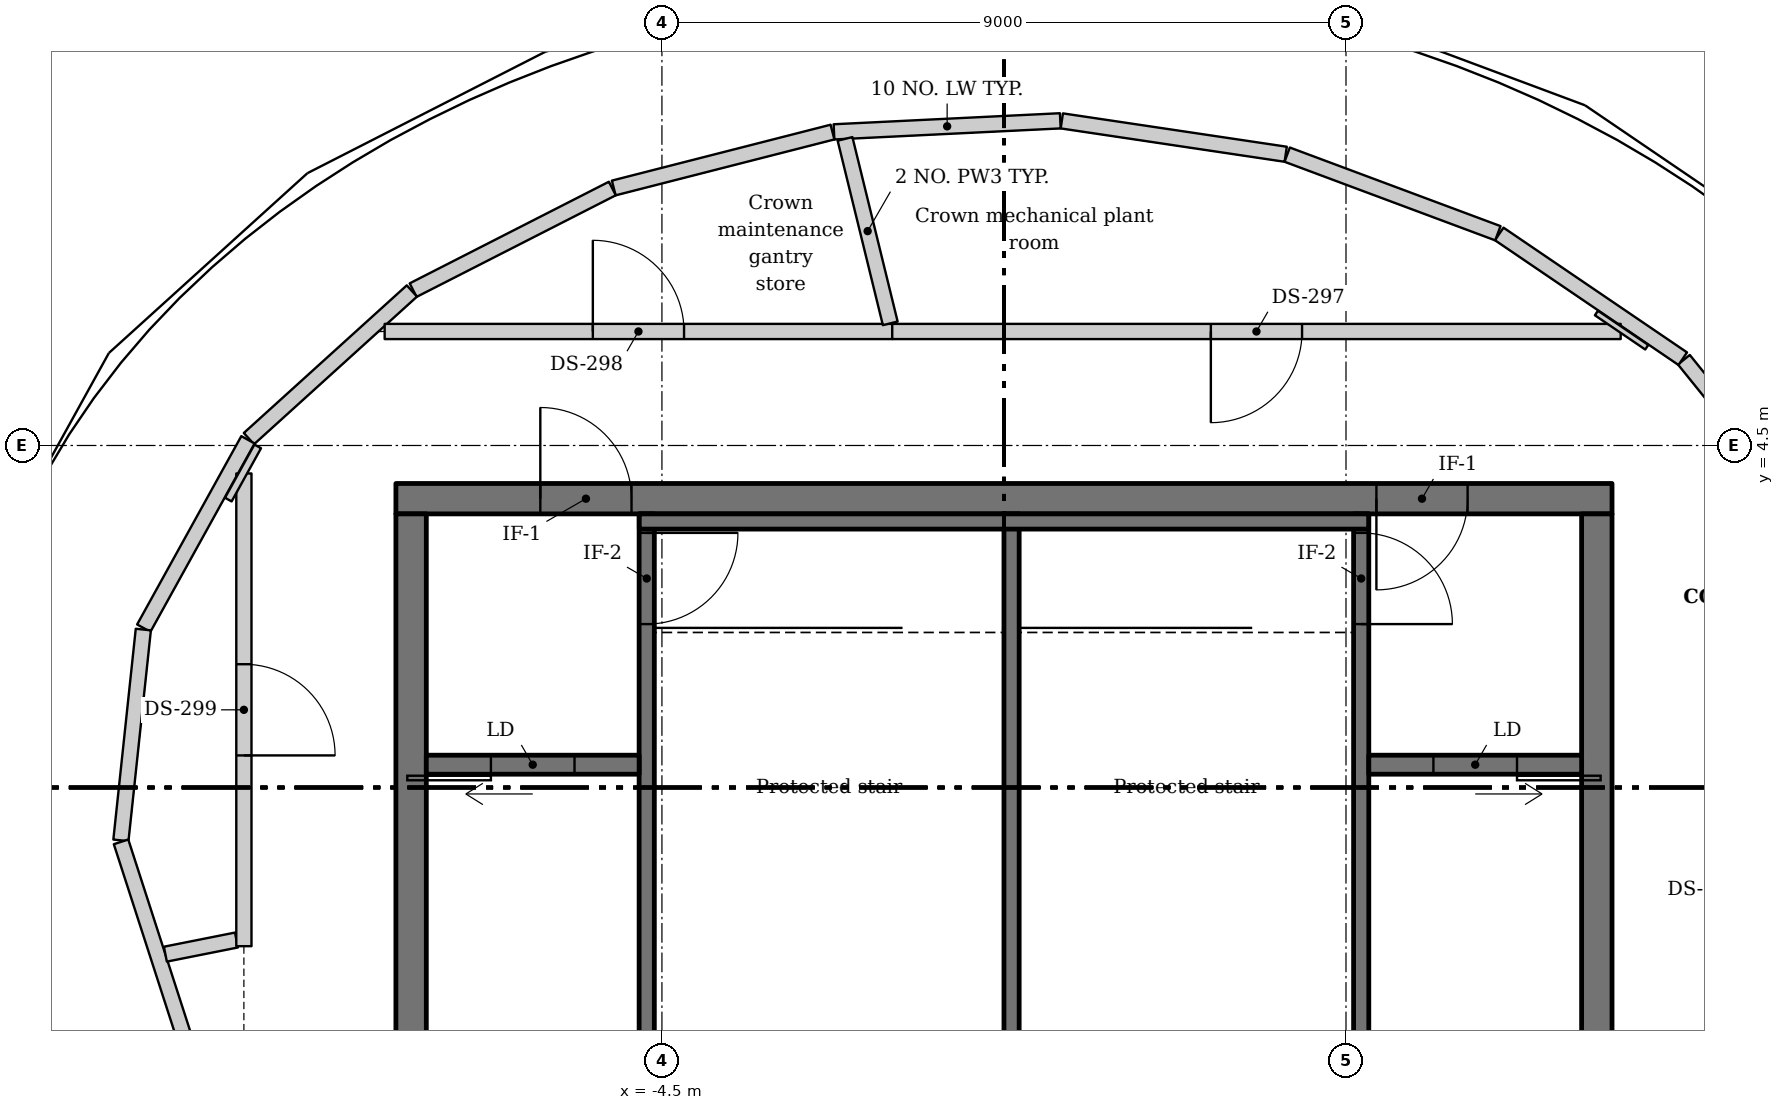
"""IFC4 building model, lengths in metres.
Left out: names, types, materials, properties, quantities, classifications, styles, units other than length and angle.
Written with IfcOpenShell. Run it as: python <this file> out.ifc"""

import sys

from ifc_helpers import new_model, si_unit, direction, frame, frame_2d, origin, place, context, subcontext, project, spatial, rectangle, extrude, source, transform, mapped, element, fill, save


model = new_model("IFC4")
c1 = context("Model", 3, precision=1e-05, world=origin(), true_north=direction((0.0, 1.0)))
c2 = subcontext(c1, "Body", "Model", "MODEL_VIEW")
j1 = project(units=[si_unit("LENGTHUNIT", "METRE"), si_unit("PLANEANGLEUNIT", "RADIAN")], contexts=[c1])
p1 = place(None, origin())
s1 = spatial("IfcSite", under=j1, at=p1, CompositionType="ELEMENT")
p2 = place(p1, origin())
s2 = spatial("IfcBuilding", under=s1, at=p2, CompositionType="ELEMENT")
p3 = place(p2, frame((0.0, 0.0, 370.0)))
s3 = spatial("IfcBuildingStorey", under=s2, at=p3, CompositionType="ELEMENT", Elevation=370.0)
m1 = source(origin(), c2, "Body", "SweptSolid", [
    extrude(rectangle(XDim=16.0, YDim=0.4, at=frame_2d((8.0, 0.0))), origin(), (0.0, 0.0, 1.0), 4.45),
])
p4 = place(p3, frame((-8.0, 3.8, -0.25), z_axis=(0.0, 0.0, 1.0), x_axis=(1.0, 0.0, 0.0)))
e1 = element("IfcWall", 1, at=p4, inside=s3, PredefinedType="SHEAR", context=c2, shape_type="MappedRepresentation", body=[
    mapped(m1, transform((0.0, 0.0, 0.0))),
])
m2 = source(origin(), c2, "Body", "SweptSolid", [
    extrude(rectangle(XDim=1.2, YDim=2.1, at=frame_2d((0.6, 1.05))), frame((0.0, 0.21, 0.0), z_axis=(0.0, -1.0, 0.0), x_axis=(1.0, 0.0, 0.0)), (0.0, 0.0, 1.0), 0.42),
])
p5 = place(p4, frame((12.9, 0.0, 0.25)))
e2 = element("IfcOpeningElement", 2, at=p5, cuts=e1, PredefinedType="OPENING", context=c2, shape_type="MappedRepresentation", body=[
    mapped(m2, transform((0.0, 0.0, 0.0))),
])
p6 = place(p4, frame((1.9, 0.0, 0.25)))
e3 = element("IfcOpeningElement", 3, at=p6, cuts=e1, PredefinedType="OPENING", context=c2, shape_type="MappedRepresentation", body=[
    mapped(m2, transform((0.0, 0.0, 0.0))),
])
m3 = source(origin(), c2, "Body", "SweptSolid", [
    extrude(rectangle(XDim=7.2, YDim=0.4, at=frame_2d((3.6, 0.0))), origin(), (0.0, 0.0, 1.0), 4.45),
])
for number, where, z_axis, x_axis in (
    (4, (7.8, -3.6, -0.25), (0.0, 0.0, 1.0), (0.0, 1.0, 0.0)),
    (5, (-7.8, -3.6, -0.25), (0.0, 0.0, 1.0), (0.0, 1.0, 0.0)),
):
    element("IfcWall", number, at=place(p3, frame(where, z_axis=z_axis, x_axis=x_axis)), inside=s3, PredefinedType="SHEAR", context=c2, shape_type="MappedRepresentation", body=[
        mapped(m3, transform((0.0, 0.0, 0.0))),
    ])
m4 = source(origin(), c2, "Body", "SweptSolid", [
    extrude(rectangle(XDim=2.863, YDim=0.2, at=frame_2d((1.432, 0.0))), origin(), (0.0, 0.0, 1.0), 4.2),
])
p7 = place(p3, frame((8.945, 5.629, 0.0), z_axis=(0.0, 0.0, 1.0), x_axis=(0.628223975098, -0.77803254245, 0.0)))
e6 = element("IfcWall", 6, at=p7, inside=s3, PredefinedType="SOLIDWALL", context=c2, shape_type="MappedRepresentation", body=[
    mapped(m4, transform((0.0, 0.0, 0.0))),
])
m5 = source(origin(), c2, "Body", "SweptSolid", [
    extrude(rectangle(XDim=2.92, YDim=0.2, at=frame_2d((1.46, 0.0))), origin(), (0.0, 0.0, 1.0), 4.2),
])
p8 = place(p3, frame((6.516, 7.284, 0.0), z_axis=(0.0, 0.0, 1.0), x_axis=(0.827026010812, -0.562163657168, 0.0)))
e7 = element("IfcWall", 7, at=p8, inside=s3, PredefinedType="SOLIDWALL", context=c2, shape_type="MappedRepresentation", body=[
    mapped(m5, transform((0.0, 0.0, 0.0))),
])
m6 = source(origin(), c2, "Body", "SweptSolid", [
    extrude(rectangle(XDim=2.958, YDim=0.2, at=frame_2d((1.479, 0.0))), origin(), (0.0, 0.0, 1.0), 4.2),
])
p9 = place(p3, frame((3.726, 8.327, 0.0), z_axis=(0.0, 0.0, 1.0), x_axis=(0.936917921025, -0.349549437508, 0.0)))
e8 = element("IfcWall", 8, at=p9, inside=s3, PredefinedType="SOLIDWALL", context=c2, shape_type="MappedRepresentation", body=[
    mapped(m6, transform((0.0, 0.0, 0.0))),
])
m7 = source(origin(), c2, "Body", "SweptSolid", [
    extrude(rectangle(XDim=2.978, YDim=0.2, at=frame_2d((1.489, 0.0))), origin(), (0.0, 0.0, 1.0), 4.2),
])
p10 = place(p3, frame((0.761, 8.771, 0.0), z_axis=(0.0, 0.0, 1.0), x_axis=(0.989067040899, -0.147466567759, 0.0)))
e9 = element("IfcWall", 9, at=p10, inside=s3, PredefinedType="SOLIDWALL", context=c2, shape_type="MappedRepresentation", body=[
    mapped(m7, transform((0.0, 0.0, 0.0))),
])
m8 = source(origin(), c2, "Body", "SweptSolid", [
    extrude(rectangle(XDim=2.981, YDim=0.2, at=frame_2d((1.491, 0.0))), origin(), (0.0, 0.0, 1.0), 4.2),
])
p11 = place(p3, frame((-2.236, 8.627, 0.0), z_axis=(0.0, 0.0, 1.0), x_axis=(0.998812059487, 0.048728531928, 0.0)))
e10 = element("IfcWall", 10, at=p11, inside=s3, PredefinedType="SOLIDWALL", context=c2, shape_type="MappedRepresentation", body=[
    mapped(m8, transform((0.0, 0.0, 0.0))),
])
m9 = source(origin(), c2, "Body", "SweptSolid", [
    extrude(rectangle(XDim=2.97, YDim=0.2, at=frame_2d((1.485, 0.0))), origin(), (0.0, 0.0, 1.0), 4.2),
])
p12 = place(p3, frame((-5.134, 7.888, 0.0), z_axis=(0.0, 0.0, 1.0), x_axis=(0.968872424501, 0.247560548235, 0.0)))
e11 = element("IfcWall", 11, at=p12, inside=s3, PredefinedType="SOLIDWALL", context=c2, shape_type="MappedRepresentation", body=[
    mapped(m9, transform((0.0, 0.0, 0.0))),
])
m10 = source(origin(), c2, "Body", "SweptSolid", [
    extrude(rectangle(XDim=2.942, YDim=0.2, at=frame_2d((1.471, 0.0))), origin(), (0.0, 0.0, 1.0), 4.2),
])
p13 = place(p3, frame((-7.773, 6.544, 0.0), z_axis=(0.0, 0.0, 1.0), x_axis=(0.890779694992, 0.454435402439, 0.0)))
e12 = element("IfcWall", 12, at=p13, inside=s3, PredefinedType="SOLIDWALL", context=c2, shape_type="MappedRepresentation", body=[
    mapped(m10, transform((0.0, 0.0, 0.0))),
])
m11 = source(origin(), c2, "Body", "SweptSolid", [
    extrude(rectangle(XDim=2.894, YDim=0.2, at=frame_2d((1.447, 0.0))), origin(), (0.0, 0.0, 1.0), 4.2),
])
p14 = place(p3, frame((-9.934, 4.59, 0.0), z_axis=(0.0, 0.0, 1.0), x_axis=(0.741091893943, 0.671403607923, 0.0)))
e13 = element("IfcWall", 13, at=p14, inside=s3, PredefinedType="SOLIDWALL", context=c2, shape_type="MappedRepresentation", body=[
    mapped(m11, transform((0.0, 0.0, 0.0))),
])
m12 = source(origin(), c2, "Body", "SweptSolid", [
    extrude(rectangle(XDim=2.832, YDim=0.2, at=frame_2d((1.416, 0.0))), origin(), (0.0, 0.0, 1.0), 4.2),
])
p15 = place(p3, frame((-11.317, 2.097, 0.0), z_axis=(0.0, 0.0, 1.0), x_axis=(0.484068407446, 0.875030157716, 0.0)))
e14 = element("IfcWall", 14, at=p15, inside=s3, PredefinedType="SOLIDWALL", context=c2, shape_type="MappedRepresentation", body=[
    mapped(m12, transform((0.0, 0.0, 0.0))),
])
m13 = source(origin(), c2, "Body", "SweptSolid", [
    extrude(rectangle(XDim=2.789, YDim=0.2, at=frame_2d((1.395, 0.0))), origin(), (0.0, 0.0, 1.0), 4.2),
])
p16 = place(p3, frame((-11.618, -0.696, 0.0), z_axis=(0.0, 0.0, 1.0), x_axis=(0.105819200095, 0.994385386503, 0.0)))
e15 = element("IfcWall", 15, at=p16, inside=s3, PredefinedType="SOLIDWALL", context=c2, shape_type="MappedRepresentation", body=[
    mapped(m13, transform((0.0, 0.0, 0.0))),
])
m14 = source(origin(), c2, "Body", "SweptSolid", [
    extrude(rectangle(XDim=2.804, YDim=0.2, at=frame_2d((1.402, 0.0))), origin(), (0.0, 0.0, 1.0), 4.2),
])
p17 = place(p3, frame((-10.754, -3.384, 0.0), z_axis=(0.0, 0.0, 1.0), x_axis=(-0.30756994526, 0.951525474579, 0.0)))
e16 = element("IfcWall", 16, at=p17, inside=s3, PredefinedType="SOLIDWALL", context=c2, shape_type="MappedRepresentation", body=[
    mapped(m14, transform((0.0, 0.0, 0.0))),
])
m15 = source(origin(), c2, "Body", "SweptSolid", [
    extrude(rectangle(XDim=7.2, YDim=0.2, at=frame_2d((3.6, 0.0))), origin(), (0.0, 0.0, 1.0), 4.2),
])
p18 = place(p3, frame((0.1, 3.6, 0.0), z_axis=(0.0, 0.0, 1.0), x_axis=(0.0, -1.0, 0.0)))
e17 = element("IfcWall", 17, at=p18, inside=s3, PredefinedType="SHEAR", context=c2, shape_type="MappedRepresentation", body=[
    mapped(m15, transform((0.0, 0.0, 0.0))),
])
p19 = place(p3, frame((4.7, -3.6, 0.0), z_axis=(0.0, 0.0, 1.0), x_axis=(0.0, 1.0, 0.0)))
e18 = element("IfcWall", 18, at=p19, inside=s3, PredefinedType="SHEAR", context=c2, shape_type="MappedRepresentation", body=[
    mapped(m15, transform((0.0, 0.0, 0.0))),
])
m16 = source(origin(), c2, "Body", "SweptSolid", [
    extrude(rectangle(XDim=1.2, YDim=2.1, at=frame_2d((0.6, 1.05))), frame((0.0, 0.11, 0.0), z_axis=(0.0, -1.0, 0.0), x_axis=(1.0, 0.0, 0.0)), (0.0, 0.0, 1.0), 0.22),
])
p20 = place(p19, frame((5.75, 0.0, 0.0)))
e19 = element("IfcOpeningElement", 19, at=p20, cuts=e18, PredefinedType="OPENING", context=c2, shape_type="MappedRepresentation", body=[
    mapped(m16, transform((0.0, 0.0, 0.0))),
])
p21 = place(p3, frame((-4.7, 3.6, 0.0), z_axis=(0.0, 0.0, 1.0), x_axis=(0.0, -1.0, 0.0)))
e20 = element("IfcWall", 20, at=p21, inside=s3, PredefinedType="SHEAR", context=c2, shape_type="MappedRepresentation", body=[
    mapped(m15, transform((0.0, 0.0, 0.0))),
])
p22 = place(p21, frame((0.25, 0.0, 0.0)))
e21 = element("IfcOpeningElement", 21, at=p22, cuts=e20, PredefinedType="OPENING", context=c2, shape_type="MappedRepresentation", body=[
    mapped(m16, transform((0.0, 0.0, 0.0))),
])
m17 = source(origin(), c2, "Body", "SweptSolid", [
    extrude(rectangle(XDim=2.8, YDim=0.25, at=frame_2d((1.4, 0.0))), origin(), (0.0, 0.0, 1.0), 4.2),
])
p23 = place(p3, frame((7.6, 0.3, 0.0), z_axis=(0.0, 0.0, 1.0), x_axis=(-1.0, 0.0, 0.0)))
e22 = element("IfcWall", 22, at=p23, inside=s3, PredefinedType="SHEAR", context=c2, shape_type="MappedRepresentation", body=[
    mapped(m17, transform((0.0, 0.0, 0.0))),
])
m18 = source(origin(), c2, "Body", "SweptSolid", [
    extrude(rectangle(XDim=1.1, YDim=2.1, at=frame_2d((0.55, 1.05))), frame((0.0, 0.135, 0.0), z_axis=(0.0, -1.0, 0.0), x_axis=(1.0, 0.0, 0.0)), (0.0, 0.0, 1.0), 0.27),
])
p24 = place(p23, frame((0.85, 0.0, 0.0)))
e23 = element("IfcOpeningElement", 23, at=p24, cuts=e22, PredefinedType="OPENING", context=c2, shape_type="MappedRepresentation", body=[
    mapped(m18, transform((0.0, 0.0, 0.0))),
])
p25 = place(p3, frame((-4.8, 0.3, 0.0), z_axis=(0.0, 0.0, 1.0), x_axis=(-1.0, 0.0, 0.0)))
e24 = element("IfcWall", 24, at=p25, inside=s3, PredefinedType="SHEAR", context=c2, shape_type="MappedRepresentation", body=[
    mapped(m17, transform((0.0, 0.0, 0.0))),
])
p26 = place(p25, frame((0.85, 0.0, 0.0)))
e25 = element("IfcOpeningElement", 25, at=p26, cuts=e24, PredefinedType="OPENING", context=c2, shape_type="MappedRepresentation", body=[
    mapped(m18, transform((0.0, 0.0, 0.0))),
])
m19 = source(origin(), c2, "Body", "SweptSolid", [
    extrude(rectangle(XDim=9.596, YDim=0.2, at=frame_2d((4.798, 0.0))), origin(), (0.0, 0.0, 1.0), 4.2),
])
p27 = place(p3, frame((4.798, 3.5, 0.0), z_axis=(0.0, 0.0, 1.0), x_axis=(-1.0, 0.0, 0.0)))
e26 = element("IfcWall", 26, at=p27, inside=s3, PredefinedType="SHEAR", context=c2, shape_type="MappedRepresentation", body=[
    mapped(m19, transform((0.0, 0.0, 0.0))),
])
m20 = source(origin(), c2, "Body", "SweptSolid", [
    extrude(rectangle(XDim=0.953, YDim=0.2, at=frame_2d((0.477, 0.0))), origin(), (0.0, 0.0, 1.0), 4.2),
])
p28 = place(p3, frame((-10.098, -2.007, 0.0), z_axis=(0.0, 0.0, 1.0), x_axis=(-0.980777163818, -0.19513112241, 0.0)))
e27 = element("IfcWall", 27, at=p28, inside=s3, PredefinedType="PARTITIONING", context=c2, shape_type="MappedRepresentation", body=[
    mapped(m20, transform((0.0, 0.0, 0.0))),
])
m21 = source(origin(), c2, "Body", "SweptSolid", [
    extrude(rectangle(XDim=6.22, YDim=0.2, at=frame_2d((3.11, 0.0))), origin(), (0.0, 0.0, 1.0), 4.2),
])
p29 = place(p3, frame((-10.0, -2.088, 0.0), z_axis=(0.0, 0.0, 1.0), x_axis=(0.0, 1.0, 0.0)))
e28 = element("IfcWall", 28, at=p29, inside=s3, PredefinedType="PARTITIONING", context=c2, shape_type="MappedRepresentation", body=[
    mapped(m21, transform((0.0, 0.0, 0.0))),
])
p30 = place(p29, frame((2.51, 0.0, 0.0)))
e29 = element("IfcOpeningElement", 29, at=p30, cuts=e28, PredefinedType="OPENING", context=c2, shape_type="MappedRepresentation", body=[
    mapped(m16, transform((0.0, 0.0, 0.0))),
])
m22 = source(origin(), c2, "Body", "SweptSolid", [
    extrude(rectangle(XDim=6.678, YDim=0.2, at=frame_2d((3.339, 0.0))), origin(), (0.0, 0.0, 1.0), 4.2),
])
p31 = place(p3, frame((-8.148, 6.0, 0.0), z_axis=(0.0, 0.0, 1.0), x_axis=(1.0, 0.0, 0.0)))
e30 = element("IfcWall", 30, at=p31, inside=s3, PredefinedType="PARTITIONING", context=c2, shape_type="MappedRepresentation", body=[
    mapped(m22, transform((0.0, 0.0, 0.0))),
])
p32 = place(p31, frame((2.739, 0.0, 0.0)))
e31 = element("IfcOpeningElement", 31, at=p32, cuts=e30, PredefinedType="OPENING", context=c2, shape_type="MappedRepresentation", body=[
    mapped(m16, transform((0.0, 0.0, 0.0))),
])
m23 = source(origin(), c2, "Body", "SweptSolid", [
    extrude(rectangle(XDim=2.499, YDim=0.2, at=frame_2d((1.25, 0.0))), origin(), (0.0, 0.0, 1.0), 4.2),
])
p33 = place(p3, frame((-1.496, 6.107, 0.0), z_axis=(0.0, 0.0, 1.0), x_axis=(-0.238096332587, 0.971241543803, 0.0)))
e32 = element("IfcWall", 32, at=p33, inside=s3, PredefinedType="PARTITIONING", context=c2, shape_type="MappedRepresentation", body=[
    mapped(m23, transform((0.0, 0.0, 0.0))),
])
m24 = source(origin(), c2, "Body", "SweptSolid", [
    extrude(rectangle(XDim=9.584, YDim=0.2, at=frame_2d((4.792, 0.0))), origin(), (0.0, 0.0, 1.0), 4.2),
])
p34 = place(p3, frame((-1.47, 6.0, 0.0), z_axis=(0.0, 0.0, 1.0), x_axis=(1.0, 0.0, 0.0)))
e33 = element("IfcWall", 33, at=p34, inside=s3, PredefinedType="PARTITIONING", context=c2, shape_type="MappedRepresentation", body=[
    mapped(m24, transform((0.0, 0.0, 0.0))),
])
p35 = place(p34, frame((4.192, 0.0, 0.0)))
e34 = element("IfcOpeningElement", 34, at=p35, cuts=e33, PredefinedType="OPENING", context=c2, shape_type="MappedRepresentation", body=[
    mapped(m16, transform((0.0, 0.0, 0.0))),
])
m25 = source(origin(), c2, "Body", "SweptSolid", [
    extrude(rectangle(XDim=0.8, YDim=0.1, at=frame_2d((0.4, 0.0))), origin(), (0.0, 0.0, 1.0), 4.2),
])
p36 = place(p3, frame((-10.205, 3.788, 0.0), z_axis=(0.0, 0.0, 1.0), x_axis=(0.483827639596, 0.875163307711, 0.0)))
e35 = element("IfcWall", 35, at=p36, inside=s3, PredefinedType="PARTITIONING", context=c2, shape_type="MappedRepresentation", body=[
    mapped(m25, transform((0.0, 0.0, 0.0))),
])
m26 = source(origin(), c2, "Body", "SweptSolid", [
    extrude(rectangle(XDim=0.801, YDim=0.073, at=frame_2d((0.4, 0.0))), origin(), (0.0, 0.0, 1.0), 4.2),
])
p37 = place(p3, frame((7.795, 6.243, 0.0), z_axis=(0.0, 0.0, 1.0), x_axis=(0.827090966084, -0.562068086465, 0.0)))
e36 = element("IfcWall", 36, at=p37, inside=s3, PredefinedType="PARTITIONING", context=c2, shape_type="MappedRepresentation", body=[
    mapped(m26, transform((0.0, 0.0, 0.0))),
])
m27 = source(origin(), c2, "Body", "SweptSolid", [
    extrude(rectangle(XDim=1.1, YDim=2.1, at=frame_2d((0.55, 1.05))), frame((0.0, 0.025, 0.0), z_axis=(0.0, -1.0, 0.0), x_axis=(1.0, 0.0, 0.0)), (0.0, 0.0, 1.0), 0.05),
])
p38 = place(p24, origin())
e37 = element("IfcDoor", 37, at=p38, inside=s3, OperationType="SLIDING_TO_LEFT", PredefinedType="DOOR", context=c2, shape_type="MappedRepresentation", body=[
    mapped(m27, transform((0.0, 0.0, 0.0))),
])
fill(e23, e37)
m28 = source(origin(), c2, "Body", "SweptSolid", [
    extrude(rectangle(XDim=1.2, YDim=2.1, at=frame_2d((0.6, 1.05))), frame((0.0, 0.025, 0.0), z_axis=(0.0, -1.0, 0.0), x_axis=(1.0, 0.0, 0.0)), (0.0, 0.0, 1.0), 0.05),
])
p39 = place(p20, origin())
e38 = element("IfcDoor", 38, at=p39, inside=s3, OperationType="SINGLE_SWING_RIGHT", PredefinedType="DOOR", context=c2, shape_type="MappedRepresentation", body=[
    mapped(m28, transform((0.0, 0.0, 0.0))),
])
fill(e19, e38)
p40 = place(p26, origin())
e39 = element("IfcDoor", 39, at=p40, inside=s3, OperationType="SLIDING_TO_RIGHT", PredefinedType="DOOR", context=c2, shape_type="MappedRepresentation", body=[
    mapped(m27, transform((0.0, 0.0, 0.0))),
])
fill(e25, e39)
p41 = place(p22, origin())
e40 = element("IfcDoor", 40, at=p41, inside=s3, OperationType="SINGLE_SWING_LEFT", PredefinedType="DOOR", context=c2, shape_type="MappedRepresentation", body=[
    mapped(m28, transform((0.0, 0.0, 0.0))),
])
fill(e21, e40)
p42 = place(p5, origin())
e41 = element("IfcDoor", 41, at=p42, inside=s3, OperationType="SINGLE_SWING_LEFT", PredefinedType="DOOR", context=c2, shape_type="MappedRepresentation", body=[
    mapped(m28, transform((0.0, 0.0, 0.0))),
])
fill(e2, e41)
p43 = place(p6, origin())
e42 = element("IfcDoor", 42, at=p43, inside=s3, OperationType="SINGLE_SWING_LEFT", PredefinedType="DOOR", context=c2, shape_type="MappedRepresentation", body=[
    mapped(m28, transform((0.0, 0.0, 0.0))),
])
fill(e3, e42)
m29 = source(origin(), c2, "Body", "SweptSolid", [
    extrude(rectangle(XDim=1.2, YDim=2.1, at=frame_2d((0.6, 1.05))), frame((0.0, 0.025, 0.0), z_axis=(0.0, -1.0, 0.0), x_axis=(1.0, 0.0, 0.0)), (0.0, 0.0, 1.0), 0.05),
])
p44 = place(p35, origin())
e43 = element("IfcDoor", 43, at=p44, inside=s3, OperationType="SINGLE_SWING_LEFT", PredefinedType="DOOR", context=c2, shape_type="MappedRepresentation", body=[
    mapped(m29, transform((0.0, 0.0, 0.0))),
])
fill(e34, e43)
p45 = place(p32, origin())
e44 = element("IfcDoor", 44, at=p45, inside=s3, OperationType="SINGLE_SWING_LEFT", PredefinedType="DOOR", context=c2, shape_type="MappedRepresentation", body=[
    mapped(m29, transform((0.0, 0.0, 0.0))),
])
fill(e31, e44)
p46 = place(p30, origin())
e45 = element("IfcDoor", 45, at=p46, inside=s3, OperationType="SINGLE_SWING_LEFT", PredefinedType="DOOR", context=c2, shape_type="MappedRepresentation", body=[
    mapped(m29, transform((0.0, 0.0, 0.0))),
])
fill(e29, e45)
save(model, sys.argv[1])
